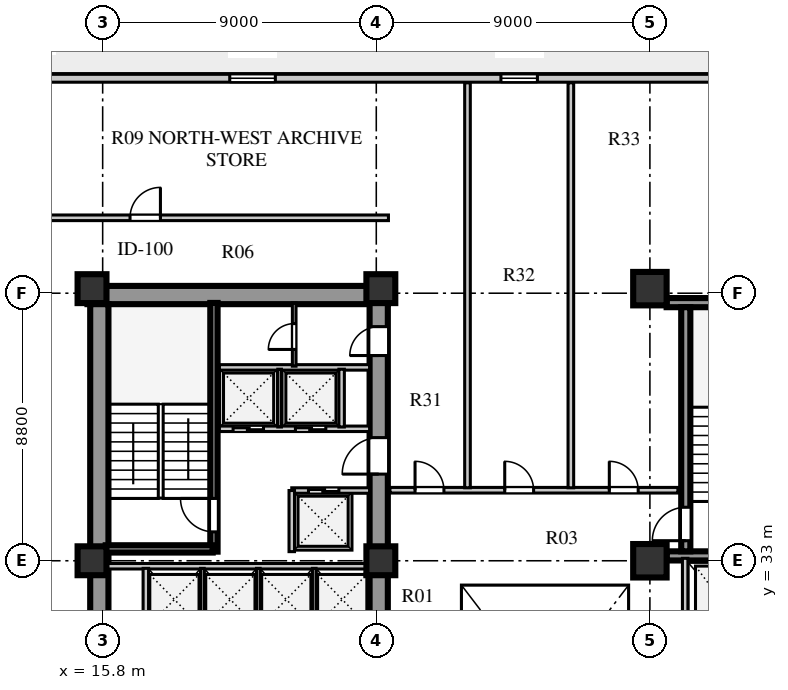
"""IFC4 building model, lengths in metres.
Left out: names, types, materials, properties, quantities, classifications, styles, units other than length and angle.
Written with IfcOpenShell. Run it as: python <this file> out.ifc"""

import sys

from ifc_helpers import new_model, si_unit, direction, frame, frame_2d, origin, origin_2d, place, context, subcontext, project, spatial, rectangle, extrude, element, fill, save


model = new_model("IFC4")
c1 = context("Model", 3, precision=1e-05, world=origin(), true_north=direction((0.0, 1.0)))
c2 = subcontext(c1, "Body", "Model", "MODEL_VIEW")
j1 = project(units=[si_unit("LENGTHUNIT", "METRE"), si_unit("PLANEANGLEUNIT", "RADIAN")], contexts=[c1])
p1 = place(None, origin())
s1 = spatial("IfcSite", under=j1, at=p1, CompositionType="ELEMENT")
p2 = place(p1, origin())
s2 = spatial("IfcBuilding", under=s1, at=p2, CompositionType="ELEMENT")
p3 = place(p2, frame((0.0, 0.0, 82.0)))
s3 = spatial("IfcBuildingStorey", under=s2, at=p3, CompositionType="ELEMENT", Elevation=82.0)
p4 = place(p3, frame((15.3, 41.74, 0.0), z_axis=(0.0, 0.0, 1.0), x_axis=(1.0, 0.0, 0.0)))
e1 = element("IfcWall", 1, at=p4, inside=s3, PredefinedType="SHEAR", context=c2, shape_type="SweptSolid", body=[
    extrude(rectangle(XDim=9.88, YDim=0.6, at=frame_2d((4.94, 0.0))), origin(), (0.0, 0.0, 1.0), 3.74),
])
p5 = place(p3, frame((15.69, 15.81, 0.0), z_axis=(0.0, 0.0, 1.0), x_axis=(0.0, 1.0, 0.0)))
e2 = element("IfcWall", 2, at=p5, inside=s3, PredefinedType="SHEAR", context=c2, shape_type="SweptSolid", body=[
    extrude(rectangle(XDim=25.63, YDim=0.6, at=frame_2d((12.815, 0.0))), origin(), (0.0, 0.0, 1.0), 3.74),
])
p6 = place(p3, frame((24.88, 15.74, 0.0), z_axis=(0.0, 0.0, 1.0), x_axis=(0.0, 1.0, 0.0)))
e3 = element("IfcWall", 3, at=p6, inside=s3, PredefinedType="SHEAR", context=c2, shape_type="SweptSolid", body=[
    extrude(rectangle(XDim=25.76, YDim=0.6, at=frame_2d((12.88, 0.0))), origin(), (0.0, 0.0, 1.0), 3.74),
])
p7 = place(p6, frame((1.61, 0.0, 0.0)))
e4 = element("IfcOpeningElement", 4, at=p7, cuts=e3, PredefinedType="OPENING", context=c2, shape_type="SweptSolid", body=[
    extrude(rectangle(XDim=1.2, YDim=2.1, at=frame_2d((0.6, 1.05))), frame((0.0, 0.31, 0.0), z_axis=(0.0, -1.0, 0.0), x_axis=(1.0, 0.0, 0.0)), (0.0, 0.0, 1.0), 0.62),
])
p8 = place(p6, frame((6.78, 0.0, 0.0)))
e5 = element("IfcOpeningElement", 5, at=p8, cuts=e3, PredefinedType="OPENING", context=c2, shape_type="SweptSolid", body=[
    extrude(rectangle(XDim=0.85, YDim=2.06, at=frame_2d((0.425, 1.03))), frame((0.0, 0.31, 0.0), z_axis=(0.0, -1.0, 0.0), x_axis=(1.0, 0.0, 0.0)), (0.0, 0.0, 1.0), 0.62),
])
p9 = place(p6, frame((12.11, 0.0, 0.0)))
e6 = element("IfcOpeningElement", 6, at=p9, cuts=e3, PredefinedType="OPENING", context=c2, shape_type="SweptSolid", body=[
    extrude(rectangle(XDim=1.5, YDim=2.12, at=frame_2d((0.75, 1.06))), frame((0.0, 0.31, 0.0), z_axis=(0.0, -1.0, 0.0), x_axis=(1.0, 0.0, 0.0)), (0.0, 0.0, 1.0), 0.62),
])
p10 = place(p6, frame((20.11, 0.0, 0.0)))
e7 = element("IfcOpeningElement", 7, at=p10, cuts=e3, PredefinedType="OPENING", context=c2, shape_type="SweptSolid", body=[
    extrude(rectangle(XDim=1.2, YDim=2.12, at=frame_2d((0.6, 1.06))), frame((0.0, 0.31, 0.0), z_axis=(0.0, -1.0, 0.0), x_axis=(1.0, 0.0, 0.0)), (0.0, 0.0, 1.0), 0.62),
])
p11 = place(p6, frame((24.01, 0.0, 0.0)))
e8 = element("IfcOpeningElement", 8, at=p11, cuts=e3, PredefinedType="OPENING", context=c2, shape_type="SweptSolid", body=[
    extrude(rectangle(XDim=0.95, YDim=2.1, at=frame_2d((0.475, 1.05))), frame((0.0, 0.31, 0.0), z_axis=(0.0, -1.0, 0.0), x_axis=(1.0, 0.0, 0.0)), (0.0, 0.0, 1.0), 0.62),
])
for number, where, z_axis, x_axis in (
    (9, (34.35, 33.16, 0.0), (0.0, 0.0, 1.0), (1.0, 0.0, 0.0)),
    (10, (34.35, 41.49, 0.0), (0.0, 0.0, 1.0), (1.0, 0.0, 0.0)),
):
    element("IfcWall", number, at=place(p3, frame(where, z_axis=z_axis, x_axis=x_axis)), inside=s3, PredefinedType="SHEAR", context=c2, shape_type="SweptSolid", body=[
        extrude(rectangle(XDim=4.52, YDim=0.3, at=frame_2d((2.26, 0.0))), origin(), (0.0, 0.0, 1.0), 3.74),
    ])
p12 = place(p3, frame((34.98, 33.31, 0.0), z_axis=(0.0, 0.0, 1.0), x_axis=(0.0, 1.0, 0.0)))
e11 = element("IfcWall", 11, at=p12, inside=s3, PredefinedType="SHEAR", context=c2, shape_type="SweptSolid", body=[
    extrude(rectangle(XDim=8.03, YDim=0.3, at=frame_2d((4.015, 0.0))), origin(), (0.0, 0.0, 1.0), 3.74),
])
p13 = place(p12, frame((0.35, 0.0, 0.0)))
e12 = element("IfcOpeningElement", 12, at=p13, cuts=e11, PredefinedType="OPENING", context=c2, shape_type="SweptSolid", body=[
    extrude(rectangle(XDim=1.1, YDim=2.1, at=frame_2d((0.55, 1.05))), frame((0.0, 0.16, 0.0), z_axis=(0.0, -1.0, 0.0), x_axis=(1.0, 0.0, 0.0)), (0.0, 0.0, 1.0), 0.32),
])
for number, where, z_axis, x_axis in (
    (13, (15.45, 33.0, 0.0), (0.0, 0.0, 1.0), (1.0, 0.0, 0.0)),
    (14, (15.45, 41.95, 0.0), (0.0, 0.0, 1.0), (1.0, 0.0, 0.0)),
    (15, (24.95, 33.0, 0.0), (0.0, 0.0, 1.0), (1.0, 0.0, 0.0)),
    (16, (24.95, 41.95, 0.0), (0.0, 0.0, 1.0), (1.0, 0.0, 0.0)),
):
    element("IfcColumn", number, at=place(p3, frame(where, z_axis=z_axis, x_axis=x_axis)), inside=s3, PredefinedType="COLUMN", context=c2, shape_type="SweptSolid", body=[
        extrude(rectangle(XDim=0.95, YDim=0.95, at=origin_2d()), origin(), (0.0, 0.0, 1.0), 3.74),
    ])
for number, where, z_axis, x_axis in (
    (17, (33.8, 33.0, 0.0), (0.0, 0.0, 1.0), (1.0, 0.0, 0.0)),
    (18, (33.8, 41.95, 0.0), (0.0, 0.0, 1.0), (1.0, 0.0, 0.0)),
):
    element("IfcColumn", number, at=place(p3, frame(where, z_axis=z_axis, x_axis=x_axis)), inside=s3, PredefinedType="COLUMN", context=c2, shape_type="SweptSolid", body=[
        extrude(rectangle(XDim=1.1, YDim=1.1, at=origin_2d()), origin(), (0.0, 0.0, 1.0), 3.74),
    ])
p14 = place(p3, frame((46.6, 48.87, 0.0), z_axis=(0.0, 0.0, 1.0), x_axis=(-1.0, 0.0, 0.0)))
e19 = element("IfcWall", 19, at=p14, inside=s3, PredefinedType="SOLIDWALL", context=c2, shape_type="SweptSolid", body=[
    extrude(rectangle(XDim=34.6, YDim=0.26, at=frame_2d((17.3, 0.0))), origin(), (0.0, 0.0, 1.0), 3.74),
])
p15 = place(p14, frame((32.65, 0.0, 0.0)))
e20 = element("IfcOpeningElement", 20, at=p15, cuts=e19, PredefinedType="OPENING", context=c2, shape_type="SweptSolid", body=[
    extrude(rectangle(XDim=1.0, YDim=2.05, at=frame_2d((0.5, 1.025))), frame((0.0, 0.14, 0.0), z_axis=(0.0, -1.0, 0.0), x_axis=(1.0, 0.0, 0.0)), (0.0, 0.0, 1.0), 0.28),
])
p16 = place(p14, frame((25.12, 0.0, 0.8)))
e21 = element("IfcOpeningElement", 21, at=p16, cuts=e19, PredefinedType="OPENING", context=c2, shape_type="SweptSolid", body=[
    extrude(rectangle(XDim=1.5, YDim=2.0, at=frame_2d((0.75, 1.0))), frame((0.0, 0.14, 0.0), z_axis=(0.0, -1.0, 0.0), x_axis=(1.0, 0.0, 0.0)), (0.0, 0.0, 1.0), 0.28),
])
p17 = place(p14, frame((16.5, 0.0, 0.8)))
e22 = element("IfcOpeningElement", 22, at=p17, cuts=e19, PredefinedType="OPENING", context=c2, shape_type="SweptSolid", body=[
    extrude(rectangle(XDim=1.2, YDim=1.75, at=frame_2d((0.6, 0.875))), frame((0.0, 0.14, 0.0), z_axis=(0.0, -1.0, 0.0), x_axis=(1.0, 0.0, 0.0)), (0.0, 0.0, 1.0), 0.28),
])
p18 = place(p14, frame((6.555, 0.0, 0.8)))
e23 = element("IfcOpeningElement", 23, at=p18, cuts=e19, PredefinedType="OPENING", context=c2, shape_type="SweptSolid", body=[
    extrude(rectangle(XDim=2.4, YDim=2.05, at=frame_2d((1.2, 1.025))), frame((0.0, 0.14, 0.0), z_axis=(0.0, -1.0, 0.0), x_axis=(1.0, 0.0, 0.0)), (0.0, 0.0, 1.0), 0.28),
])
p19 = place(p3, frame((15.9, 32.82, 0.0), z_axis=(0.0, 0.0, 1.0), x_axis=(1.0, 0.0, 0.0)))
e24 = element("IfcWall", 24, at=p19, inside=s3, PredefinedType="SOLIDWALL", context=c2, shape_type="SweptSolid", body=[
    extrude(rectangle(XDim=8.68, YDim=0.18, at=frame_2d((4.34, 0.0))), origin(), (0.0, 0.0, 1.0), 3.04),
])
p20 = place(p3, frame((17.22, 30.7, 0.0), z_axis=(0.0, 0.0, 1.0), x_axis=(0.0, 1.0, 0.0)))
e25 = element("IfcWall", 25, at=p20, inside=s3, PredefinedType="SOLIDWALL", context=c2, shape_type="SweptSolid", body=[
    extrude(rectangle(XDim=2.05, YDim=0.18, at=frame_2d((1.025, 0.0))), origin(), (0.0, 0.0, 1.0), 3.74),
])
for number, where, z_axis, x_axis in (
    (26, (19.08, 30.7, 0.0), (0.0, 0.0, 1.0), (0.0, 1.0, 0.0)),
    (27, (20.92, 30.7, 0.0), (0.0, 0.0, 1.0), (0.0, 1.0, 0.0)),
    (28, (22.76, 30.7, 0.0), (0.0, 0.0, 1.0), (0.0, 1.0, 0.0)),
):
    element("IfcWall", number, at=place(p3, frame(where, z_axis=z_axis, x_axis=x_axis)), inside=s3, PredefinedType="PARTITIONING", context=c2, shape_type="SweptSolid", body=[
        extrude(rectangle(XDim=2.05, YDim=0.12, at=frame_2d((1.025, 0.0))), origin(), (0.0, 0.0, 1.0), 3.74),
    ])
p21 = place(p3, frame((19.46, 33.3, 0.0), z_axis=(0.0, 0.0, 1.0), x_axis=(0.0, 1.0, 0.0)))
e29 = element("IfcWall", 29, at=p21, inside=s3, PredefinedType="SHEAR", context=c2, shape_type="SweptSolid", body=[
    extrude(rectangle(XDim=8.18, YDim=0.24, at=frame_2d((4.09, 0.0))), origin(), (0.0, 0.0, 1.0), 4.0),
])
p22 = place(p21, frame((0.65, 0.0, 0.0)))
e30 = element("IfcOpeningElement", 30, at=p22, cuts=e29, PredefinedType="OPENING", context=c2, shape_type="SweptSolid", body=[
    extrude(rectangle(XDim=1.1, YDim=2.1, at=frame_2d((0.55, 1.05))), frame((0.0, 0.13, 0.0), z_axis=(0.0, -1.0, 0.0), x_axis=(1.0, 0.0, 0.0)), (0.0, 0.0, 1.0), 0.26),
])
p23 = place(p3, frame((15.9, 33.39, 0.0), z_axis=(0.0, 0.0, 1.0), x_axis=(1.0, 0.0, 0.0)))
e31 = element("IfcWall", 31, at=p23, inside=s3, PredefinedType="SHEAR", context=c2, shape_type="SweptSolid", body=[
    extrude(rectangle(XDim=3.52, YDim=0.24, at=frame_2d((1.76, 0.0))), origin(), (0.0, 0.0, 1.0), 4.0),
])
p24 = place(p3, frame((22.02, 35.31, 0.0), z_axis=(0.0, 0.0, 1.0), x_axis=(1.0, 0.0, 0.0)))
e32 = element("IfcWall", 32, at=p24, inside=s3, PredefinedType="SOLIDWALL", context=c2, shape_type="SweptSolid", body=[
    extrude(rectangle(XDim=2.56, YDim=0.18, at=frame_2d((1.28, 0.0))), origin(), (0.0, 0.0, 1.0), 3.74),
])
p25 = place(p24, frame((0.55, 0.0, 0.0)))
e33 = element("IfcOpeningElement", 33, at=p25, cuts=e32, PredefinedType="OPENING", context=c2, shape_type="SweptSolid", body=[
    extrude(rectangle(XDim=1.0, YDim=2.1, at=frame_2d((0.5, 1.05))), frame((0.0, 0.1, 0.0), z_axis=(0.0, -1.0, 0.0), x_axis=(1.0, 0.0, 0.0)), (0.0, 0.0, 1.0), 0.2),
])
p26 = place(p3, frame((22.02, 33.3, 0.0), z_axis=(0.0, 0.0, 1.0), x_axis=(0.0, 1.0, 0.0)))
e34 = element("IfcWall", 34, at=p26, inside=s3, PredefinedType="SOLIDWALL", context=c2, shape_type="SweptSolid", body=[
    extrude(rectangle(XDim=2.01, YDim=0.18, at=frame_2d((1.005, 0.0))), origin(), (0.0, 0.0, 1.0), 3.74),
])
p27 = place(p3, frame((19.64, 37.34, 0.0), z_axis=(0.0, 0.0, 1.0), x_axis=(1.0, 0.0, 0.0)))
e35 = element("IfcWall", 35, at=p27, inside=s3, PredefinedType="SOLIDWALL", context=c2, shape_type="SweptSolid", body=[
    extrude(rectangle(XDim=4.94, YDim=0.18, at=frame_2d((2.47, 0.0))), origin(), (0.0, 0.0, 1.0), 3.74),
])
p28 = place(p27, frame((0.45, 0.0, 0.0)))
e36 = element("IfcOpeningElement", 36, at=p28, cuts=e35, PredefinedType="OPENING", context=c2, shape_type="SweptSolid", body=[
    extrude(rectangle(XDim=1.0, YDim=2.1, at=frame_2d((0.5, 1.05))), frame((0.0, 0.1, 0.0), z_axis=(0.0, -1.0, 0.0), x_axis=(1.0, 0.0, 0.0)), (0.0, 0.0, 1.0), 0.2),
])
p29 = place(p27, frame((2.5, 0.0, 0.0)))
e37 = element("IfcOpeningElement", 37, at=p29, cuts=e35, PredefinedType="OPENING", context=c2, shape_type="SweptSolid", body=[
    extrude(rectangle(XDim=1.0, YDim=2.1, at=frame_2d((0.5, 1.05))), frame((0.0, 0.1, 0.0), z_axis=(0.0, -1.0, 0.0), x_axis=(1.0, 0.0, 0.0)), (0.0, 0.0, 1.0), 0.2),
])
p30 = place(p3, frame((19.64, 39.36, 0.0), z_axis=(0.0, 0.0, 1.0), x_axis=(1.0, 0.0, 0.0)))
e38 = element("IfcWall", 38, at=p30, inside=s3, PredefinedType="SOLIDWALL", context=c2, shape_type="SweptSolid", body=[
    extrude(rectangle(XDim=4.94, YDim=0.18, at=frame_2d((2.47, 0.0))), origin(), (0.0, 0.0, 1.0), 3.74),
])
p31 = place(p3, frame((21.62, 37.4, 0.0), z_axis=(0.0, 0.0, 1.0), x_axis=(0.0, 1.0, 0.0)))
e39 = element("IfcWall", 39, at=p31, inside=s3, PredefinedType="PARTITIONING", context=c2, shape_type="SweptSolid", body=[
    extrude(rectangle(XDim=1.9, YDim=0.12, at=frame_2d((0.95, 0.0))), origin(), (0.0, 0.0, 1.0), 3.74),
])
p32 = place(p3, frame((23.66, 37.4, 0.0), z_axis=(0.0, 0.0, 1.0), x_axis=(0.0, 1.0, 0.0)))
e40 = element("IfcWall", 40, at=p32, inside=s3, PredefinedType="SOLIDWALL", context=c2, shape_type="SweptSolid", body=[
    extrude(rectangle(XDim=1.9, YDim=0.18, at=frame_2d((0.95, 0.0))), origin(), (0.0, 0.0, 1.0), 3.74),
])
p33 = place(p3, frame((22.1, 39.4, 0.0), z_axis=(0.0, 0.0, 1.0), x_axis=(0.0, 1.0, 0.0)))
e41 = element("IfcWall", 41, at=p33, inside=s3, PredefinedType="PARTITIONING", context=c2, shape_type="SweptSolid", body=[
    extrude(rectangle(XDim=2.08, YDim=0.12, at=frame_2d((1.04, 0.0))), origin(), (0.0, 0.0, 1.0), 3.74),
])
p34 = place(p33, frame((0.55, 0.0, 0.0)))
e42 = element("IfcOpeningElement", 42, at=p34, cuts=e41, PredefinedType="OPENING", context=c2, shape_type="SweptSolid", body=[
    extrude(rectangle(XDim=0.85, YDim=2.06, at=frame_2d((0.425, 1.03))), frame((0.0, 0.07, 0.0), z_axis=(0.0, -1.0, 0.0), x_axis=(1.0, 0.0, 0.0)), (0.0, 0.0, 1.0), 0.14),
])
p35 = place(p3, frame((34.96, 28.86, 0.0), z_axis=(0.0, 0.0, 1.0), x_axis=(0.0, 1.0, 0.0)))
e43 = element("IfcWall", 43, at=p35, inside=s3, PredefinedType="SOLIDWALL", context=c2, shape_type="SweptSolid", body=[
    extrude(rectangle(XDim=4.22, YDim=0.18, at=frame_2d((2.11, 0.0))), origin(), (0.0, 0.0, 1.0), 3.74),
])
p36 = place(p3, frame((25.25, 35.32, 0.0), z_axis=(0.0, 0.0, 1.0), x_axis=(1.0, 0.0, 0.0)))
e44 = element("IfcWall", 44, at=p36, inside=s3, PredefinedType="SOLIDWALL", context=c2, shape_type="SweptSolid", body=[
    extrude(rectangle(XDim=9.47, YDim=0.185, at=frame_2d((4.735, 0.0))), origin(), (0.0, 0.0, 1.0), 3.74),
])
p37 = place(p36, frame((0.825, 0.0, 0.0)))
e45 = element("IfcOpeningElement", 45, at=p37, cuts=e44, PredefinedType="OPENING", context=c2, shape_type="SweptSolid", body=[
    extrude(rectangle(XDim=0.95, YDim=2.08, at=frame_2d((0.475, 1.04))), frame((0.0, 0.103, 0.0), z_axis=(0.0, -1.0, 0.0), x_axis=(1.0, 0.0, 0.0)), (0.0, 0.0, 1.0), 0.205),
])
p38 = place(p36, frame((3.775, 0.0, 0.0)))
e46 = element("IfcOpeningElement", 46, at=p38, cuts=e44, PredefinedType="OPENING", context=c2, shape_type="SweptSolid", body=[
    extrude(rectangle(XDim=0.95, YDim=2.08, at=frame_2d((0.475, 1.04))), frame((0.0, 0.103, 0.0), z_axis=(0.0, -1.0, 0.0), x_axis=(1.0, 0.0, 0.0)), (0.0, 0.0, 1.0), 0.205),
])
p39 = place(p36, frame((7.215, 0.0, 0.0)))
e47 = element("IfcOpeningElement", 47, at=p39, cuts=e44, PredefinedType="OPENING", context=c2, shape_type="SweptSolid", body=[
    extrude(rectangle(XDim=0.95, YDim=2.08, at=frame_2d((0.475, 1.04))), frame((0.0, 0.103, 0.0), z_axis=(0.0, -1.0, 0.0), x_axis=(1.0, 0.0, 0.0)), (0.0, 0.0, 1.0), 0.205),
])
p40 = place(p3, frame((10.5, 44.28, 0.0), z_axis=(0.0, 0.0, 1.0), x_axis=(1.0, 0.0, 0.0)))
e48 = element("IfcWall", 48, at=p40, inside=s3, PredefinedType="SOLIDWALL", context=c2, shape_type="SweptSolid", body=[
    extrude(rectangle(XDim=14.7, YDim=0.185, at=frame_2d((7.35, 0.0))), origin(), (0.0, 0.0, 1.0), 3.74),
])
p41 = place(p40, frame((6.2, 0.0, 0.0)))
e49 = element("IfcOpeningElement", 49, at=p41, cuts=e48, PredefinedType="OPENING", context=c2, shape_type="SweptSolid", body=[
    extrude(rectangle(XDim=1.0, YDim=2.08, at=frame_2d((0.5, 1.04))), frame((0.0, 0.103, 0.0), z_axis=(0.0, -1.0, 0.0), x_axis=(1.0, 0.0, 0.0)), (0.0, 0.0, 1.0), 0.205),
])
for number, where, z_axis, x_axis in (
    (50, (27.8, 35.4, 0.0), (0.0, 0.0, 1.0), (0.0, 1.0, 0.0)),
    (51, (31.2, 35.4, 0.0), (0.0, 0.0, 1.0), (0.0, 1.0, 0.0)),
):
    element("IfcWall", number, at=place(p3, frame(where, z_axis=z_axis, x_axis=x_axis)), inside=s3, PredefinedType="SOLIDWALL", context=c2, shape_type="SweptSolid", body=[
        extrude(rectangle(XDim=13.32, YDim=0.185, at=frame_2d((6.66, 0.0))), origin(), (0.0, 0.0, 1.0), 3.74),
    ])
p42 = place(p16, origin())
e52 = element("IfcWindow", 52, at=p42, inside=s3, PartitioningType="SINGLE_PANEL", PredefinedType="WINDOW", context=c2, shape_type="SweptSolid", body=[
    extrude(rectangle(XDim=1.5, YDim=2.0, at=frame_2d((0.75, 1.0))), frame((0.0, 0.03, 0.0), z_axis=(0.0, -1.0, 0.0), x_axis=(1.0, 0.0, 0.0)), (0.0, 0.0, 1.0), 0.06),
])
fill(e21, e52)
p43 = place(p17, origin())
e53 = element("IfcWindow", 53, at=p43, inside=s3, PartitioningType="SINGLE_PANEL", PredefinedType="WINDOW", context=c2, shape_type="SweptSolid", body=[
    extrude(rectangle(XDim=1.2, YDim=1.75, at=frame_2d((0.6, 0.875))), frame((0.0, 0.03, 0.0), z_axis=(0.0, -1.0, 0.0), x_axis=(1.0, 0.0, 0.0)), (0.0, 0.0, 1.0), 0.06),
])
fill(e22, e53)
p44 = place(p22, origin())
e54 = element("IfcDoor", 54, at=p44, inside=s3, OperationType="SINGLE_SWING_RIGHT", PredefinedType="DOOR", context=c2, shape_type="SweptSolid", body=[
    extrude(rectangle(XDim=1.1, YDim=2.1, at=frame_2d((0.55, 1.05))), frame((0.0, 0.025, 0.0), z_axis=(0.0, -1.0, 0.0), x_axis=(1.0, 0.0, 0.0)), (0.0, 0.0, 1.0), 0.05),
])
fill(e30, e54)
p45 = place(p10, frame((1.2, 0.0, 0.0), z_axis=(0.0, 0.0, 1.0), x_axis=(-1.0, 0.0, 0.0)))
e55 = element("IfcDoor", 55, at=p45, inside=s3, OperationType="SINGLE_SWING_RIGHT", PredefinedType="DOOR", context=c2, shape_type="SweptSolid", body=[
    extrude(rectangle(XDim=1.2, YDim=2.12, at=frame_2d((0.6, 1.06))), frame((0.0, 0.025, 0.0), z_axis=(0.0, -1.0, 0.0), x_axis=(1.0, 0.0, 0.0)), (0.0, 0.0, 1.0), 0.05),
])
fill(e7, e55)
p46 = place(p28, frame((1.0, 0.0, 0.0), z_axis=(0.0, 0.0, 1.0), x_axis=(-1.0, 0.0, 0.0)))
e56 = element("IfcDoor", 56, at=p46, inside=s3, OperationType="DOUBLE_DOOR_SLIDING", PredefinedType="DOOR", context=c2, shape_type="SweptSolid", body=[
    extrude(rectangle(XDim=1.0, YDim=2.1, at=frame_2d((0.5, 1.05))), frame((0.0, 0.025, 0.0), z_axis=(0.0, -1.0, 0.0), x_axis=(1.0, 0.0, 0.0)), (0.0, 0.0, 1.0), 0.05),
])
fill(e36, e56)
p47 = place(p29, frame((1.0, 0.0, 0.0), z_axis=(0.0, 0.0, 1.0), x_axis=(-1.0, 0.0, 0.0)))
e57 = element("IfcDoor", 57, at=p47, inside=s3, OperationType="DOUBLE_DOOR_SLIDING", PredefinedType="DOOR", context=c2, shape_type="SweptSolid", body=[
    extrude(rectangle(XDim=1.0, YDim=2.1, at=frame_2d((0.5, 1.05))), frame((0.0, 0.025, 0.0), z_axis=(0.0, -1.0, 0.0), x_axis=(1.0, 0.0, 0.0)), (0.0, 0.0, 1.0), 0.05),
])
fill(e37, e57)
p48 = place(p25, origin())
e58 = element("IfcDoor", 58, at=p48, inside=s3, OperationType="DOUBLE_DOOR_SLIDING", PredefinedType="DOOR", context=c2, shape_type="SweptSolid", body=[
    extrude(rectangle(XDim=1.0, YDim=2.1, at=frame_2d((0.5, 1.05))), frame((0.0, 0.025, 0.0), z_axis=(0.0, -1.0, 0.0), x_axis=(1.0, 0.0, 0.0)), (0.0, 0.0, 1.0), 0.05),
])
fill(e33, e58)
p49 = place(p34, origin())
e59 = element("IfcDoor", 59, at=p49, inside=s3, OperationType="SINGLE_SWING_LEFT", PredefinedType="DOOR", context=c2, shape_type="SweptSolid", body=[
    extrude(rectangle(XDim=0.85, YDim=2.06, at=frame_2d((0.425, 1.03))), frame((0.0, 0.025, 0.0), z_axis=(0.0, -1.0, 0.0), x_axis=(1.0, 0.0, 0.0)), (0.0, 0.0, 1.0), 0.05),
])
fill(e42, e59)
p50 = place(p11, frame((0.95, 0.0, 0.0), z_axis=(0.0, 0.0, 1.0), x_axis=(-1.0, 0.0, 0.0)))
e60 = element("IfcDoor", 60, at=p50, inside=s3, OperationType="SINGLE_SWING_RIGHT", PredefinedType="DOOR", context=c2, shape_type="SweptSolid", body=[
    extrude(rectangle(XDim=0.95, YDim=2.1, at=frame_2d((0.475, 1.05))), frame((0.0, 0.025, 0.0), z_axis=(0.0, -1.0, 0.0), x_axis=(1.0, 0.0, 0.0)), (0.0, 0.0, 1.0), 0.05),
])
fill(e8, e60)
p51 = place(p13, origin())
e61 = element("IfcDoor", 61, at=p51, inside=s3, OperationType="SINGLE_SWING_LEFT", PredefinedType="DOOR", context=c2, shape_type="SweptSolid", body=[
    extrude(rectangle(XDim=1.1, YDim=2.1, at=frame_2d((0.55, 1.05))), frame((0.0, 0.025, 0.0), z_axis=(0.0, -1.0, 0.0), x_axis=(1.0, 0.0, 0.0)), (0.0, 0.0, 1.0), 0.05),
])
fill(e12, e61)
p52 = place(p41, origin())
e62 = element("IfcDoor", 62, at=p52, inside=s3, OperationType="SINGLE_SWING_RIGHT", PredefinedType="DOOR", context=c2, shape_type="SweptSolid", body=[
    extrude(rectangle(XDim=1.0, YDim=2.08, at=frame_2d((0.5, 1.04))), frame((0.0, 0.025, 0.0), z_axis=(0.0, -1.0, 0.0), x_axis=(1.0, 0.0, 0.0)), (0.0, 0.0, 1.0), 0.05),
])
fill(e49, e62)
p53 = place(p37, origin())
e63 = element("IfcDoor", 63, at=p53, inside=s3, OperationType="SINGLE_SWING_LEFT", PredefinedType="DOOR", context=c2, shape_type="SweptSolid", body=[
    extrude(rectangle(XDim=0.95, YDim=2.08, at=frame_2d((0.475, 1.04))), frame((0.0, 0.025, 0.0), z_axis=(0.0, -1.0, 0.0), x_axis=(1.0, 0.0, 0.0)), (0.0, 0.0, 1.0), 0.05),
])
fill(e45, e63)
p54 = place(p38, origin())
e64 = element("IfcDoor", 64, at=p54, inside=s3, OperationType="SINGLE_SWING_LEFT", PredefinedType="DOOR", context=c2, shape_type="SweptSolid", body=[
    extrude(rectangle(XDim=0.95, YDim=2.08, at=frame_2d((0.475, 1.04))), frame((0.0, 0.025, 0.0), z_axis=(0.0, -1.0, 0.0), x_axis=(1.0, 0.0, 0.0)), (0.0, 0.0, 1.0), 0.05),
])
fill(e46, e64)
p55 = place(p39, origin())
e65 = element("IfcDoor", 65, at=p55, inside=s3, OperationType="SINGLE_SWING_LEFT", PredefinedType="DOOR", context=c2, shape_type="SweptSolid", body=[
    extrude(rectangle(XDim=0.95, YDim=2.08, at=frame_2d((0.475, 1.04))), frame((0.0, 0.025, 0.0), z_axis=(0.0, -1.0, 0.0), x_axis=(1.0, 0.0, 0.0)), (0.0, 0.0, 1.0), 0.05),
])
fill(e47, e65)
save(model, sys.argv[1])
